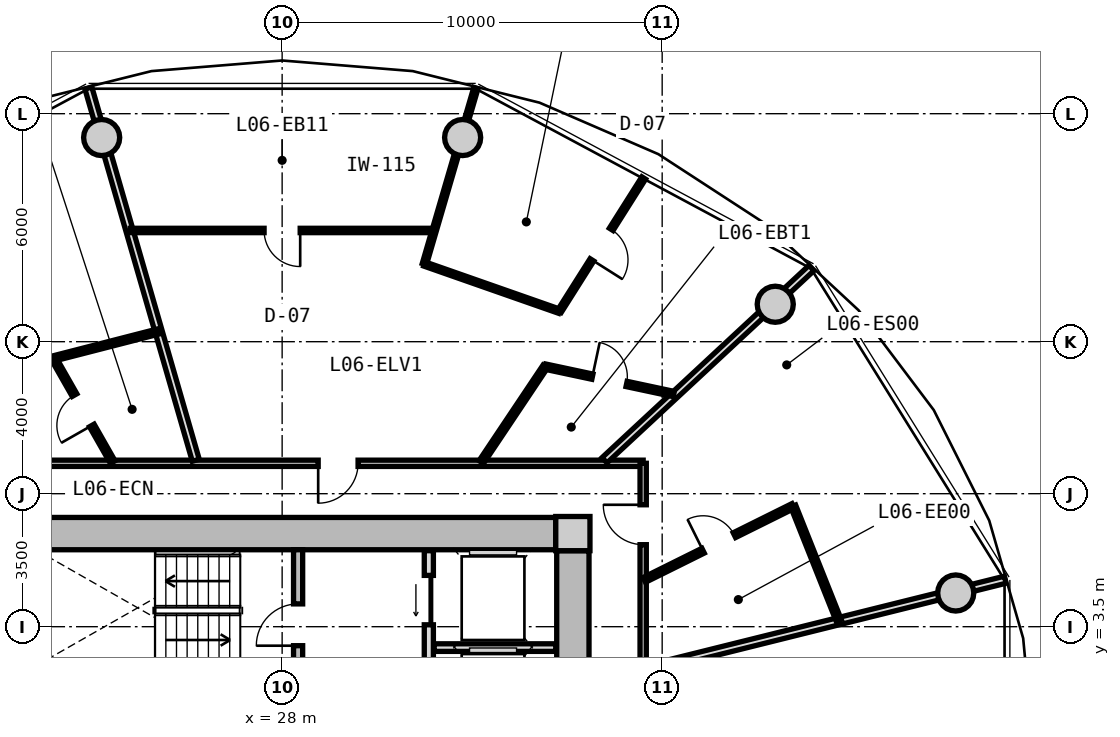
"""IFC4 building model, lengths in metres.
Left out: names, types, materials, properties, quantities, classifications, styles, units other than length and angle.
Written with IfcOpenShell. Run it as: python <this file> out.ifc"""

import sys

from ifc_helpers import new_model, si_unit, direction, frame, frame_2d, origin, origin_2d, place, context, subcontext, project, spatial, rectangle, circle, extrude, source, transform, mapped, element, fill, save


model = new_model("IFC4")
c1 = context("Model", 3, precision=1e-05, world=origin(), true_north=direction((0.0, 1.0)))
c2 = subcontext(c1, "Body", "Model", "MODEL_VIEW")
j1 = project(units=[si_unit("LENGTHUNIT", "METRE"), si_unit("PLANEANGLEUNIT", "RADIAN")], contexts=[c1])
p1 = place(None, origin())
s1 = spatial("IfcSite", under=j1, at=p1, CompositionType="ELEMENT")
p2 = place(p1, origin())
s2 = spatial("IfcBuilding", under=s1, at=p2, CompositionType="ELEMENT")
p3 = place(p2, frame((0.0, 0.0, 24.65)))
s3 = spatial("IfcBuildingStorey", under=s2, at=p3, CompositionType="ELEMENT", Elevation=24.65)
m1 = source(origin(), c2, "Body", "SweptSolid", [
    extrude(rectangle(XDim=0.9, YDim=0.9, at=origin_2d()), origin(), (0.0, 0.0, 1.0), 3.05),
])
p4 = place(p3, frame((35.65, 5.95, 0.0), z_axis=(0.0, 0.0, 1.0), x_axis=(1.0, 0.0, 0.0)))
e1 = element("IfcColumn", 1, at=p4, inside=s3, PredefinedType="COLUMN", context=c2, shape_type="MappedRepresentation", body=[
    mapped(m1, transform((0.0, 0.0, 0.0), x_axis=(1.0, 0.0, 0.0), y_axis=(0.0, 1.0, 0.0), z_axis=(0.0, 0.0, 1.0), scale=1.0)),
])
m2 = source(origin(), c2, "Body", "SweptSolid", [
    extrude(rectangle(XDim=14.4, YDim=0.85, at=frame_2d((7.2, 0.0))), origin(), (0.0, 0.0, 1.0), 2.79),
])
p5 = place(p3, frame((20.8, 5.95, 0.0), z_axis=(0.0, 0.0, 1.0), x_axis=(1.0, 0.0, 0.0)))
e2 = element("IfcWall", 2, at=p5, inside=s3, PredefinedType="SHEAR", context=c2, shape_type="MappedRepresentation", body=[
    mapped(m2, transform((0.0, 0.0, 0.0), x_axis=(1.0, 0.0, 0.0), y_axis=(0.0, 1.0, 0.0), z_axis=(0.0, 0.0, 1.0), scale=1.0)),
])
m3 = source(origin(), c2, "Body", "SweptSolid", [
    extrude(rectangle(XDim=11.0, YDim=0.85, at=frame_2d((5.5, 0.0))), origin(), (0.0, 0.0, 1.0), 2.79),
])
p6 = place(p3, frame((35.65, 5.5, 0.0), z_axis=(0.0, 0.0, 1.0), x_axis=(0.0, -1.0, 0.0)))
e3 = element("IfcWall", 3, at=p6, inside=s3, PredefinedType="SHEAR", context=c2, shape_type="MappedRepresentation", body=[
    mapped(m3, transform((0.0, 0.0, 0.0), x_axis=(1.0, 0.0, 0.0), y_axis=(0.0, 1.0, 0.0), z_axis=(0.0, 0.0, 1.0), scale=1.0)),
])
p7 = place(p6, frame((5.65, 0.0, 0.0)))
e4 = element("IfcOpeningElement", 4, at=p7, cuts=e3, PredefinedType="OPENING", context=c2, shape_type="SweptSolid", body=[
    extrude(rectangle(XDim=1.2, YDim=2.15, at=frame_2d((0.6, 1.075))), frame((0.0, 0.435, 0.0), z_axis=(0.0, -1.0, 0.0), x_axis=(1.0, 0.0, 0.0)), (0.0, 0.0, 1.0), 0.87),
])
m4 = source(origin(), c2, "Body", "SweptSolid", [
    extrude(circle(Radius=0.475, at=origin_2d()), origin(), (0.0, 0.0, 1.0), 3.05),
])
for number, where, z_axis, x_axis in (
    (5, (45.725, 4.387, 0.0), (0.0, 0.0, 1.0), (1.0, 0.0, 0.0)),
    (6, (40.975, 11.985, 0.0), (0.0, 0.0, 1.0), (1.0, 0.0, 0.0)),
    (7, (32.749, 16.373, 0.0), (0.0, 0.0, 1.0), (1.0, 0.0, 0.0)),
    (8, (23.251, 16.373, 0.0), (0.0, 0.0, 1.0), (1.0, 0.0, 0.0)),
):
    element("IfcColumn", number, at=place(p3, frame(where, z_axis=z_axis, x_axis=x_axis)), inside=s3, PredefinedType="COLUMN", context=c2, shape_type="MappedRepresentation", body=[
        mapped(m4, transform((0.0, 0.0, 0.0), x_axis=(1.0, 0.0, 0.0), y_axis=(0.0, 1.0, 0.0), z_axis=(0.0, 0.0, 1.0), scale=1.0)),
    ])
m5 = source(origin(), c2, "Body", "SweptSolid", [
    extrude(rectangle(XDim=3.075, YDim=0.24, at=frame_2d((1.538, 0.0))), origin(), (0.0, 0.0, 1.0), 2.79),
])
p8 = place(p3, frame((28.42, 2.45, 0.0), z_axis=(0.0, 0.0, 1.0), x_axis=(0.0, 1.0, 0.0)))
e9 = element("IfcWall", 9, at=p8, inside=s3, PredefinedType="PARTITIONING", context=c2, shape_type="MappedRepresentation", body=[
    mapped(m5, transform((0.0, 0.0, 0.0), x_axis=(1.0, 0.0, 0.0), y_axis=(0.0, 1.0, 0.0), z_axis=(0.0, 0.0, 1.0), scale=1.0)),
])
p9 = place(p8, frame((0.55, 0.0, 0.0)))
e10 = element("IfcOpeningElement", 10, at=p9, cuts=e9, PredefinedType="OPENING", context=c2, shape_type="SweptSolid", body=[
    extrude(rectangle(XDim=1.1, YDim=2.15, at=frame_2d((0.55, 1.075))), frame((0.0, 0.13, 0.0), z_axis=(0.0, -1.0, 0.0), x_axis=(1.0, 0.0, 0.0)), (0.0, 0.0, 1.0), 0.26),
])
m6 = source(origin(), c2, "Body", "SweptSolid", [
    extrude(rectangle(XDim=5.0, YDim=0.24, at=frame_2d((2.5, 0.0))), origin(), (0.0, 0.0, 1.0), 2.775),
])
p10 = place(p3, frame((31.86, 0.5, 0.0), z_axis=(0.0, 0.0, 1.0), x_axis=(0.0, 1.0, 0.0)))
e11 = element("IfcWall", 11, at=p10, inside=s3, PredefinedType="PARTITIONING", context=c2, shape_type="MappedRepresentation", body=[
    mapped(m6, transform((0.0, 0.0, 0.0), x_axis=(1.0, 0.0, 0.0), y_axis=(0.0, 1.0, 0.0), z_axis=(0.0, 0.0, 1.0), scale=1.0)),
])
p11 = place(p10, frame((3.05, 0.0, 0.0)))
e12 = element("IfcOpeningElement", 12, at=p11, cuts=e11, PredefinedType="OPENING", context=c2, shape_type="SweptSolid", body=[
    extrude(rectangle(XDim=1.3, YDim=2.2, at=frame_2d((0.65, 1.1))), frame((0.0, 0.13, 0.0), z_axis=(0.0, -1.0, 0.0), x_axis=(1.0, 0.0, 0.0)), (0.0, 0.0, 1.0), 0.26),
])
p12 = place(p10, frame((0.55, 0.0, 0.0)))
e13 = element("IfcOpeningElement", 13, at=p12, cuts=e11, PredefinedType="OPENING", context=c2, shape_type="SweptSolid", body=[
    extrude(rectangle(XDim=1.3, YDim=2.2, at=frame_2d((0.65, 1.1))), frame((0.0, 0.13, 0.0), z_axis=(0.0, -1.0, 0.0), x_axis=(1.0, 0.0, 0.0)), (0.0, 0.0, 1.0), 0.26),
])
m7 = source(origin(), c2, "Body", "SweptSolid", [
    extrude(rectangle(XDim=3.2, YDim=0.2, at=frame_2d((1.6, 0.0))), origin(), (0.0, 0.0, 1.0), 2.775),
])
p13 = place(p3, frame((32.0, 2.95, 0.0), z_axis=(0.0, 0.0, 1.0), x_axis=(1.0, 0.0, 0.0)))
e14 = element("IfcWall", 14, at=p13, inside=s3, PredefinedType="PARTITIONING", context=c2, shape_type="MappedRepresentation", body=[
    mapped(m7, transform((0.0, 0.0, 0.0), x_axis=(1.0, 0.0, 0.0), y_axis=(0.0, 1.0, 0.0), z_axis=(0.0, 0.0, 1.0), scale=1.0)),
])
m8 = source(origin(), c2, "Body", "SweptSolid", [
    extrude(rectangle(XDim=19.0, YDim=0.165, at=frame_2d((9.5, 0.0))), origin(), (0.0, 0.0, 1.0), 2.775),
])
p14 = place(p3, frame((18.5, 7.8, 0.0), z_axis=(0.0, 0.0, 1.0), x_axis=(1.0, 0.0, 0.0)))
e15 = element("IfcWall", 15, at=p14, inside=s3, PredefinedType="PARTITIONING", context=c2, shape_type="MappedRepresentation", body=[
    mapped(m8, transform((0.0, 0.0, 0.0), x_axis=(1.0, 0.0, 0.0), y_axis=(0.0, 1.0, 0.0), z_axis=(0.0, 0.0, 1.0), scale=1.0)),
])
p15 = place(p14, frame((10.448, 0.0, 0.0)))
e16 = element("IfcOpeningElement", 16, at=p15, cuts=e15, PredefinedType="OPENING", context=c2, shape_type="SweptSolid", body=[
    extrude(rectangle(XDim=1.05, YDim=2.15, at=frame_2d((0.525, 1.075))), frame((0.0, 0.093, 0.0), z_axis=(0.0, -1.0, 0.0), x_axis=(1.0, 0.0, 0.0)), (0.0, 0.0, 1.0), 0.185),
])
m9 = source(origin(), c2, "Body", "SweptSolid", [
    extrude(rectangle(XDim=15.6, YDim=0.165, at=frame_2d((7.8, 0.0))), origin(), (0.0, 0.0, 1.0), 2.775),
])
p16 = place(p3, frame((37.5, 7.8, 0.0), z_axis=(0.0, 0.0, 1.0), x_axis=(0.0, -1.0, 0.0)))
e17 = element("IfcWall", 17, at=p16, inside=s3, PredefinedType="PARTITIONING", context=c2, shape_type="MappedRepresentation", body=[
    mapped(m9, transform((0.0, 0.0, 0.0), x_axis=(1.0, 0.0, 0.0), y_axis=(0.0, 1.0, 0.0), z_axis=(0.0, 0.0, 1.0), scale=1.0)),
])
p17 = place(p16, frame((12.141, 0.0, 0.0)))
e18 = element("IfcOpeningElement", 18, at=p17, cuts=e17, PredefinedType="OPENING", context=c2, shape_type="SweptSolid", body=[
    extrude(rectangle(XDim=1.25, YDim=2.2, at=frame_2d((0.625, 1.1))), frame((0.0, 0.093, 0.0), z_axis=(0.0, -1.0, 0.0), x_axis=(1.0, 0.0, 0.0)), (0.0, 0.0, 1.0), 0.185),
])
p18 = place(p16, frame((6.196, 0.0, 0.0)))
e19 = element("IfcOpeningElement", 19, at=p18, cuts=e17, PredefinedType="OPENING", context=c2, shape_type="SweptSolid", body=[
    extrude(rectangle(XDim=1.05, YDim=2.15, at=frame_2d((0.525, 1.075))), frame((0.0, 0.093, 0.0), z_axis=(0.0, -1.0, 0.0), x_axis=(1.0, 0.0, 0.0)), (0.0, 0.0, 1.0), 0.185),
])
p19 = place(p16, frame((1.092, 0.0, 0.0)))
e20 = element("IfcOpeningElement", 20, at=p19, cuts=e17, PredefinedType="OPENING", context=c2, shape_type="SweptSolid", body=[
    extrude(rectangle(XDim=1.05, YDim=2.15, at=frame_2d((0.525, 1.075))), frame((0.0, 0.093, 0.0), z_axis=(0.0, -1.0, 0.0), x_axis=(1.0, 0.0, 0.0)), (0.0, 0.0, 1.0), 0.185),
])
m10 = source(origin(), c2, "Body", "SweptSolid", [
    extrude(rectangle(XDim=7.435, YDim=0.19, at=frame_2d((3.717, 0.0))), origin(), (0.0, 0.0, 1.0), 2.225),
])
p20 = place(p3, frame((36.483, 7.88, 0.0), z_axis=(0.0, 0.0, 1.0), x_axis=(0.732651956848, 0.680603489652, 0.0)))
e21 = element("IfcWall", 21, at=p20, inside=s3, PredefinedType="PARTITIONING", context=c2, shape_type="MappedRepresentation", body=[
    mapped(m10, transform((0.0, 0.0, 0.0), x_axis=(1.0, 0.0, 0.0), y_axis=(0.0, 1.0, 0.0), z_axis=(0.0, 0.0, 1.0), scale=1.0)),
])
m11 = source(origin(), c2, "Body", "SweptSolid", [
    extrude(rectangle(XDim=10.196, YDim=0.19, at=frame_2d((5.098, 0.0))), origin(), (0.0, 0.0, 1.0), 2.225),
])
p21 = place(p3, frame((25.727, 7.88, 0.0), z_axis=(0.0, 0.0, 1.0), x_axis=(-0.277136420347, 0.960830580549, 0.0)))
e22 = element("IfcWall", 22, at=p21, inside=s3, PredefinedType="PARTITIONING", context=c2, shape_type="MappedRepresentation", body=[
    mapped(m11, transform((0.0, 0.0, 0.0), x_axis=(1.0, 0.0, 0.0), y_axis=(0.0, 1.0, 0.0), z_axis=(0.0, 0.0, 1.0), scale=1.0)),
])
m12 = source(origin(), c2, "Body", "SweptSolid", [
    extrude(rectangle(XDim=7.993, YDim=0.115, at=frame_2d((3.996, 0.0))), origin(), (0.0, 0.0, 1.0), 2.775),
])
p22 = place(p3, frame((31.996, 13.927, 0.0), z_axis=(0.0, 0.0, 1.0), x_axis=(-1.0, 0.0, 0.0)))
e23 = element("IfcWall", 23, at=p22, inside=s3, PredefinedType="PARTITIONING", context=c2, shape_type="MappedRepresentation", body=[
    mapped(m12, transform((0.0, 0.0, 0.0), x_axis=(1.0, 0.0, 0.0), y_axis=(0.0, 1.0, 0.0), z_axis=(0.0, 0.0, 1.0), scale=1.0)),
])
p23 = place(p22, frame((3.521, 0.0, 0.0)))
e24 = element("IfcOpeningElement", 24, at=p23, cuts=e23, PredefinedType="OPENING", context=c2, shape_type="SweptSolid", body=[
    extrude(rectangle(XDim=0.95, YDim=2.1, at=frame_2d((0.475, 1.05))), frame((0.0, 0.067, 0.0), z_axis=(0.0, -1.0, 0.0), x_axis=(1.0, 0.0, 0.0)), (0.0, 0.0, 1.0), 0.135),
])
m13 = source(origin(), c2, "Body", "SweptSolid", [
    extrude(rectangle(XDim=4.829, YDim=0.115, at=frame_2d((2.415, 0.0))), origin(), (0.0, 0.0, 1.0), 2.225),
])
p24 = place(p3, frame((31.742, 13.042, 0.0), z_axis=(0.0, 0.0, 1.0), x_axis=(0.280838556456, 0.959755023539, 0.0)))
e25 = element("IfcWall", 25, at=p24, inside=s3, PredefinedType="PARTITIONING", context=c2, shape_type="MappedRepresentation", body=[
    mapped(m13, transform((0.0, 0.0, 0.0), x_axis=(1.0, 0.0, 0.0), y_axis=(0.0, 1.0, 0.0), z_axis=(0.0, 0.0, 1.0), scale=1.0)),
])
m14 = source(origin(), c2, "Body", "SweptSolid", [
    extrude(rectangle(XDim=3.025, YDim=0.14, at=frame_2d((1.513, 0.0))), origin(), (0.0, 0.0, 1.0), 2.775),
])
p25 = place(p3, frame((33.24, 7.83, 0.0), z_axis=(0.0, 0.0, 1.0), x_axis=(0.556189165904, 0.831055721195, 0.0)))
e26 = element("IfcWall", 26, at=p25, inside=s3, PredefinedType="PARTITIONING", context=c2, shape_type="MappedRepresentation", body=[
    mapped(m14, transform((0.0, 0.0, 0.0), x_axis=(1.0, 0.0, 0.0), y_axis=(0.0, 1.0, 0.0), z_axis=(0.0, 0.0, 1.0), scale=1.0)),
])
m15 = source(origin(), c2, "Body", "SweptSolid", [
    extrude(rectangle(XDim=3.459, YDim=0.14, at=frame_2d((1.729, 0.0))), origin(), (0.0, 0.0, 1.0), 2.775),
])
p26 = place(p3, frame((34.922, 10.344, 0.0), z_axis=(0.0, 0.0, 1.0), x_axis=(0.978006468578, -0.208574560815, 0.0)))
e27 = element("IfcWall", 27, at=p26, inside=s3, PredefinedType="PARTITIONING", context=c2, shape_type="MappedRepresentation", body=[
    mapped(m15, transform((0.0, 0.0, 0.0), x_axis=(1.0, 0.0, 0.0), y_axis=(0.0, 1.0, 0.0), z_axis=(0.0, 0.0, 1.0), scale=1.0)),
])
p27 = place(p26, frame((1.27, 0.0, 0.0)))
e28 = element("IfcOpeningElement", 28, at=p27, cuts=e27, PredefinedType="OPENING", context=c2, shape_type="SweptSolid", body=[
    extrude(rectangle(XDim=0.92, YDim=2.1, at=frame_2d((0.46, 1.05))), frame((0.0, 0.08, 0.0), z_axis=(0.0, -1.0, 0.0), x_axis=(1.0, 0.0, 0.0)), (0.0, 0.0, 1.0), 0.16),
])
m16 = source(origin(), c2, "Body", "SweptSolid", [
    extrude(rectangle(XDim=4.15, YDim=0.115, at=frame_2d((2.075, 0.0))), origin(), (0.0, 0.0, 1.0), 2.775),
])
p28 = place(p3, frame((35.296, 11.801, 0.0), z_axis=(0.0, 0.0, 1.0), x_axis=(0.534475378192, 0.845184045109, 0.0)))
e29 = element("IfcWall", 29, at=p28, inside=s3, PredefinedType="PARTITIONING", context=c2, shape_type="MappedRepresentation", body=[
    mapped(m16, transform((0.0, 0.0, 0.0), x_axis=(1.0, 0.0, 0.0), y_axis=(0.0, 1.0, 0.0), z_axis=(0.0, 0.0, 1.0), scale=1.0)),
])
p29 = place(p28, frame((1.6, 0.0, 0.0)))
e30 = element("IfcOpeningElement", 30, at=p29, cuts=e29, PredefinedType="OPENING", context=c2, shape_type="SweptSolid", body=[
    extrude(rectangle(XDim=0.95, YDim=2.1, at=frame_2d((0.475, 1.05))), frame((0.0, 0.067, 0.0), z_axis=(0.0, -1.0, 0.0), x_axis=(1.0, 0.0, 0.0)), (0.0, 0.0, 1.0), 0.135),
])
m17 = source(origin(), c2, "Body", "SweptSolid", [
    extrude(rectangle(XDim=3.765, YDim=0.115, at=frame_2d((1.882, 0.0))), origin(), (0.0, 0.0, 1.0), 2.775),
])
p30 = place(p3, frame((35.296, 11.801, 0.0), z_axis=(0.0, 0.0, 1.0), x_axis=(-0.943788572669, 0.330549739222, 0.0)))
e31 = element("IfcWall", 31, at=p30, inside=s3, PredefinedType="PARTITIONING", context=c2, shape_type="MappedRepresentation", body=[
    mapped(m17, transform((0.0, 0.0, 0.0), x_axis=(1.0, 0.0, 0.0), y_axis=(0.0, 1.0, 0.0), z_axis=(0.0, 0.0, 1.0), scale=1.0)),
])
m18 = source(origin(), c2, "Body", "SweptSolid", [
    extrude(rectangle(XDim=3.141, YDim=0.14, at=frame_2d((1.571, 0.0))), origin(), (0.0, 0.0, 1.0), 2.775),
])
p31 = place(p3, frame((23.542, 7.83, 0.0), z_axis=(0.0, 0.0, 1.0), x_axis=(-0.494874486088, 0.868964465913, 0.0)))
e32 = element("IfcWall", 32, at=p31, inside=s3, PredefinedType="PARTITIONING", context=c2, shape_type="MappedRepresentation", body=[
    mapped(m18, transform((0.0, 0.0, 0.0), x_axis=(1.0, 0.0, 0.0), y_axis=(0.0, 1.0, 0.0), z_axis=(0.0, 0.0, 1.0), scale=1.0)),
])
p32 = place(p31, frame((1.111, 0.0, 0.0)))
e33 = element("IfcOpeningElement", 33, at=p32, cuts=e32, PredefinedType="OPENING", context=c2, shape_type="SweptSolid", body=[
    extrude(rectangle(XDim=0.92, YDim=2.1, at=frame_2d((0.46, 1.05))), frame((0.0, 0.08, 0.0), z_axis=(0.0, -1.0, 0.0), x_axis=(1.0, 0.0, 0.0)), (0.0, 0.0, 1.0), 0.16),
])
m19 = source(origin(), c2, "Body", "SweptSolid", [
    extrude(rectangle(XDim=2.868, YDim=0.14, at=frame_2d((1.434, 0.0))), origin(), (0.0, 0.0, 1.0), 2.775),
])
p33 = place(p3, frame((21.987, 10.56, 0.0), z_axis=(0.0, 0.0, 1.0), x_axis=(0.968467705195, 0.249139125778, 0.0)))
e34 = element("IfcWall", 34, at=p33, inside=s3, PredefinedType="PARTITIONING", context=c2, shape_type="MappedRepresentation", body=[
    mapped(m19, transform((0.0, 0.0, 0.0), x_axis=(1.0, 0.0, 0.0), y_axis=(0.0, 1.0, 0.0), z_axis=(0.0, 0.0, 1.0), scale=1.0)),
])
m20 = source(origin(), c2, "Body", "SweptSolid", [
    extrude(rectangle(XDim=9.737, YDim=0.19, at=frame_2d((4.869, 0.0))), origin(), (0.0, 0.0, 1.0), 2.225),
])
p34 = place(p3, frame((37.58, 2.385, 0.0), z_axis=(0.0, 0.0, 1.0), x_axis=(0.970392716238, 0.241532557375, 0.0)))
e35 = element("IfcWall", 35, at=p34, inside=s3, PredefinedType="PARTITIONING", context=c2, shape_type="MappedRepresentation", body=[
    mapped(m20, transform((0.0, 0.0, 0.0), x_axis=(1.0, 0.0, 0.0), y_axis=(0.0, 1.0, 0.0), z_axis=(0.0, 0.0, 1.0), scale=1.0)),
])
m21 = source(origin(), c2, "Body", "SweptSolid", [
    extrude(rectangle(XDim=4.374, YDim=0.14, at=frame_2d((2.187, 0.0))), origin(), (0.0, 0.0, 1.0), 2.775),
])
p35 = place(p3, frame((37.53, 4.732, 0.0), z_axis=(0.0, 0.0, 1.0), x_axis=(0.89568523908, 0.444688601714, 0.0)))
e36 = element("IfcWall", 36, at=p35, inside=s3, PredefinedType="PARTITIONING", context=c2, shape_type="MappedRepresentation", body=[
    mapped(m21, transform((0.0, 0.0, 0.0), x_axis=(1.0, 0.0, 0.0), y_axis=(0.0, 1.0, 0.0), z_axis=(0.0, 0.0, 1.0), scale=1.0)),
])
p36 = place(p35, frame((1.727, 0.0, 0.0)))
e37 = element("IfcOpeningElement", 37, at=p36, cuts=e36, PredefinedType="OPENING", context=c2, shape_type="SweptSolid", body=[
    extrude(rectangle(XDim=0.92, YDim=2.1, at=frame_2d((0.46, 1.05))), frame((0.0, 0.08, 0.0), z_axis=(0.0, -1.0, 0.0), x_axis=(1.0, 0.0, 0.0)), (0.0, 0.0, 1.0), 0.16),
])
m22 = source(origin(), c2, "Body", "SweptSolid", [
    extrude(rectangle(XDim=3.242, YDim=0.14, at=frame_2d((1.621, 0.0))), origin(), (0.0, 0.0, 1.0), 2.775),
])
p37 = place(p3, frame((41.447, 6.677, 0.0), z_axis=(0.0, 0.0, 1.0), x_axis=(0.36984501862, -0.929093462576, 0.0)))
e38 = element("IfcWall", 38, at=p37, inside=s3, PredefinedType="PARTITIONING", context=c2, shape_type="MappedRepresentation", body=[
    mapped(m22, transform((0.0, 0.0, 0.0), x_axis=(1.0, 0.0, 0.0), y_axis=(0.0, 1.0, 0.0), z_axis=(0.0, 0.0, 1.0), scale=1.0)),
])
m23 = source(origin(), c2, "Body", "SweptSolid", [
    extrude(rectangle(XDim=1.1, YDim=2.15, at=frame_2d((0.55, 1.075))), frame((0.0, 0.025, 0.0), z_axis=(0.0, -1.0, 0.0), x_axis=(1.0, 0.0, 0.0)), (0.0, 0.0, 1.0), 0.05),
])
p38 = place(p9, origin())
e39 = element("IfcDoor", 39, at=p38, inside=s3, OperationType="SINGLE_SWING_LEFT", PredefinedType="DOOR", context=c2, shape_type="MappedRepresentation", body=[
    mapped(m23, transform((0.0, 0.0, 0.0), x_axis=(1.0, 0.0, 0.0), y_axis=(0.0, 1.0, 0.0), z_axis=(0.0, 0.0, 1.0), scale=1.0)),
])
fill(e10, e39)
m24 = source(origin(), c2, "Body", "SweptSolid", [
    extrude(rectangle(XDim=1.3, YDim=2.2, at=frame_2d((0.65, 1.1))), frame((0.0, 0.025, 0.0), z_axis=(0.0, -1.0, 0.0), x_axis=(1.0, 0.0, 0.0)), (0.0, 0.0, 1.0), 0.05),
])
p39 = place(p11, origin())
e40 = element("IfcDoor", 40, at=p39, inside=s3, OperationType="SLIDING_TO_LEFT", PredefinedType="DOOR", context=c2, shape_type="MappedRepresentation", body=[
    mapped(m24, transform((0.0, 0.0, 0.0), x_axis=(1.0, 0.0, 0.0), y_axis=(0.0, 1.0, 0.0), z_axis=(0.0, 0.0, 1.0), scale=1.0)),
])
fill(e12, e40)
m25 = source(origin(), c2, "Body", "SweptSolid", [
    extrude(rectangle(XDim=1.05, YDim=2.15, at=frame_2d((0.525, 1.075))), frame((0.0, 0.025, 0.0), z_axis=(0.0, -1.0, 0.0), x_axis=(1.0, 0.0, 0.0)), (0.0, 0.0, 1.0), 0.05),
])
p40 = place(p15, frame((1.05, 0.0, 0.0), z_axis=(0.0, 0.0, 1.0), x_axis=(-1.0, 0.0, 0.0)))
e41 = element("IfcDoor", 41, at=p40, inside=s3, OperationType="SINGLE_SWING_RIGHT", PredefinedType="DOOR", context=c2, shape_type="MappedRepresentation", body=[
    mapped(m25, transform((0.0, 0.0, 0.0), x_axis=(1.0, 0.0, 0.0), y_axis=(0.0, 1.0, 0.0), z_axis=(0.0, 0.0, 1.0), scale=1.0)),
])
fill(e16, e41)
m26 = source(origin(), c2, "Body", "SweptSolid", [
    extrude(rectangle(XDim=0.92, YDim=2.1, at=frame_2d((0.46, 1.05))), frame((0.0, 0.025, 0.0), z_axis=(0.0, -1.0, 0.0), x_axis=(1.0, 0.0, 0.0)), (0.0, 0.0, 1.0), 0.05),
])
p41 = place(p27, origin())
e42 = element("IfcDoor", 42, at=p41, inside=s3, OperationType="SINGLE_SWING_LEFT", PredefinedType="DOOR", context=c2, shape_type="MappedRepresentation", body=[
    mapped(m26, transform((0.0, 0.0, 0.0), x_axis=(1.0, 0.0, 0.0), y_axis=(0.0, 1.0, 0.0), z_axis=(0.0, 0.0, 1.0), scale=1.0)),
])
fill(e28, e42)
m27 = source(origin(), c2, "Body", "SweptSolid", [
    extrude(rectangle(XDim=0.95, YDim=2.1, at=frame_2d((0.475, 1.05))), frame((0.0, 0.025, 0.0), z_axis=(0.0, -1.0, 0.0), x_axis=(1.0, 0.0, 0.0)), (0.0, 0.0, 1.0), 0.05),
])
p42 = place(p29, frame((0.95, 0.0, 0.0), z_axis=(0.0, 0.0, 1.0), x_axis=(-1.0, 0.0, 0.0)))
e43 = element("IfcDoor", 43, at=p42, inside=s3, OperationType="SINGLE_SWING_RIGHT", PredefinedType="DOOR", context=c2, shape_type="MappedRepresentation", body=[
    mapped(m27, transform((0.0, 0.0, 0.0), x_axis=(1.0, 0.0, 0.0), y_axis=(0.0, 1.0, 0.0), z_axis=(0.0, 0.0, 1.0), scale=1.0)),
])
fill(e30, e43)
p43 = place(p23, origin())
e44 = element("IfcDoor", 44, at=p43, inside=s3, OperationType="SINGLE_SWING_LEFT", PredefinedType="DOOR", context=c2, shape_type="MappedRepresentation", body=[
    mapped(m27, transform((0.0, 0.0, 0.0), x_axis=(1.0, 0.0, 0.0), y_axis=(0.0, 1.0, 0.0), z_axis=(0.0, 0.0, 1.0), scale=1.0)),
])
fill(e24, e44)
p44 = place(p32, origin())
e45 = element("IfcDoor", 45, at=p44, inside=s3, OperationType="SINGLE_SWING_LEFT", PredefinedType="DOOR", context=c2, shape_type="MappedRepresentation", body=[
    mapped(m26, transform((0.0, 0.0, 0.0), x_axis=(1.0, 0.0, 0.0), y_axis=(0.0, 1.0, 0.0), z_axis=(0.0, 0.0, 1.0), scale=1.0)),
])
fill(e33, e45)
p45 = place(p19, frame((1.05, 0.0, 0.0), z_axis=(0.0, 0.0, 1.0), x_axis=(-1.0, 0.0, 0.0)))
e46 = element("IfcDoor", 46, at=p45, inside=s3, OperationType="SINGLE_SWING_RIGHT", PredefinedType="DOOR", context=c2, shape_type="MappedRepresentation", body=[
    mapped(m25, transform((0.0, 0.0, 0.0), x_axis=(1.0, 0.0, 0.0), y_axis=(0.0, 1.0, 0.0), z_axis=(0.0, 0.0, 1.0), scale=1.0)),
])
fill(e20, e46)
p46 = place(p36, origin())
e47 = element("IfcDoor", 47, at=p46, inside=s3, OperationType="SINGLE_SWING_LEFT", PredefinedType="DOOR", context=c2, shape_type="MappedRepresentation", body=[
    mapped(m26, transform((0.0, 0.0, 0.0), x_axis=(1.0, 0.0, 0.0), y_axis=(0.0, 1.0, 0.0), z_axis=(0.0, 0.0, 1.0), scale=1.0)),
])
fill(e37, e47)
save(model, sys.argv[1])
